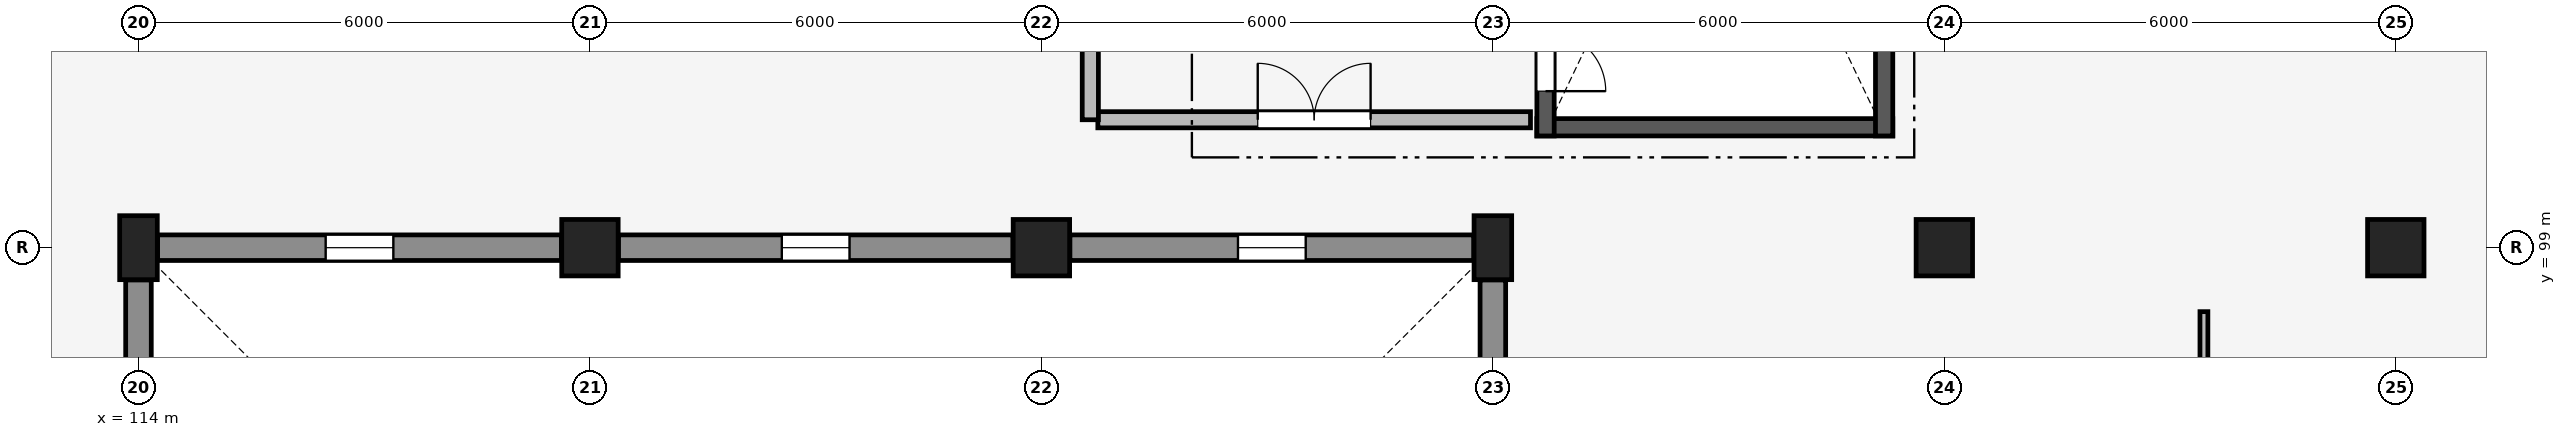
"""IFC4 building model, lengths in metres.
Left out: names, types, materials, properties, quantities, classifications, styles, units other than length and angle.
Written with IfcOpenShell. Run it as: python <this file> out.ifc"""

import sys

from ifc_helpers import new_model, si_unit, direction, frame, frame_2d, origin, origin_2d, place, context, subcontext, project, spatial, rectangle, extrude, element, fill, save


model = new_model("IFC4")
c1 = context("Model", 3, precision=1e-05, world=origin(), true_north=direction((0.0, 1.0)))
c2 = subcontext(c1, "Body", "Model", "MODEL_VIEW")
j1 = project(units=[si_unit("LENGTHUNIT", "METRE"), si_unit("PLANEANGLEUNIT", "RADIAN")], contexts=[c1])
p1 = place(None, origin())
s1 = spatial("IfcSite", under=j1, at=p1, CompositionType="ELEMENT")
p2 = place(p1, origin())
s2 = spatial("IfcBuilding", under=s1, at=p2, CompositionType="ELEMENT")
p3 = place(p2, origin())
s3 = spatial("IfcBuildingStorey", under=s2, at=p3, CompositionType="ELEMENT", Elevation=0.0)
p4 = place(p3, frame((114.0, 99.0, 0.0), z_axis=(0.0, 0.0, 1.0), x_axis=(1.0, 0.0, 0.0)))
e1 = element("IfcColumn", 1, at=p4, inside=s3, PredefinedType="COLUMN", context=c2, shape_type="SweptSolid", body=[
    extrude(rectangle(XDim=0.5, YDim=0.85, at=origin_2d()), origin(), (0.0, 0.0, 1.0), 4.8),
])
for number, where, z_axis, x_axis in (
    (2, (120.0, 99.0, 0.0), (0.0, 0.0, 1.0), (1.0, 0.0, 0.0)),
    (3, (126.0, 99.0, 0.0), (0.0, 0.0, 1.0), (1.0, 0.0, 0.0)),
):
    element("IfcColumn", number, at=place(p3, frame(where, z_axis=z_axis, x_axis=x_axis)), inside=s3, PredefinedType="COLUMN", context=c2, shape_type="SweptSolid", body=[
        extrude(rectangle(XDim=0.75, YDim=0.75, at=origin_2d()), origin(), (0.0, 0.0, 1.0), 4.8),
    ])
p5 = place(p3, frame((132.0, 99.0, 0.0), z_axis=(0.0, 0.0, 1.0), x_axis=(1.0, 0.0, 0.0)))
e4 = element("IfcColumn", 4, at=p5, inside=s3, PredefinedType="COLUMN", context=c2, shape_type="SweptSolid", body=[
    extrude(rectangle(XDim=0.5, YDim=0.85, at=origin_2d()), origin(), (0.0, 0.0, 1.0), 4.8),
])
for number, where, z_axis, x_axis in (
    (5, (138.0, 99.0, 0.0), (0.0, 0.0, 1.0), (1.0, 0.0, 0.0)),
    (6, (144.0, 99.0, 0.0), (0.0, 0.0, 1.0), (1.0, 0.0, 0.0)),
):
    element("IfcColumn", number, at=place(p3, frame(where, z_axis=z_axis, x_axis=x_axis)), inside=s3, PredefinedType="COLUMN", context=c2, shape_type="SweptSolid", body=[
        extrude(rectangle(XDim=0.75, YDim=0.75, at=origin_2d()), origin(), (0.0, 0.0, 1.0), 4.8),
    ])
p6 = place(p3, frame((114.254, 99.0, 0.0), z_axis=(0.0, 0.0, 1.0), x_axis=(1.0, 0.0, 0.0)))
e7 = element("IfcWall", 7, at=p6, inside=s3, PredefinedType="SOLIDWALL", context=c2, shape_type="SweptSolid", body=[
    extrude(rectangle(XDim=5.367, YDim=0.34, at=frame_2d((2.684, 0.0))), origin(), (0.0, 0.0, 1.0), 4.04),
])
p7 = place(p6, frame((2.233, 0.0, 1.6)))
e8 = element("IfcOpeningElement", 8, at=p7, cuts=e7, PredefinedType="OPENING", context=c2, shape_type="SweptSolid", body=[
    extrude(rectangle(XDim=0.9, YDim=0.6, at=frame_2d((0.45, 0.3))), frame((0.0, 0.18, 0.0), z_axis=(0.0, -1.0, 0.0), x_axis=(1.0, 0.0, 0.0)), (0.0, 0.0, 1.0), 0.36),
])
p8 = place(p3, frame((120.379, 99.0, 0.0), z_axis=(0.0, 0.0, 1.0), x_axis=(1.0, 0.0, 0.0)))
e9 = element("IfcWall", 9, at=p8, inside=s3, PredefinedType="SOLIDWALL", context=c2, shape_type="SweptSolid", body=[
    extrude(rectangle(XDim=5.242, YDim=0.34, at=frame_2d((2.621, 0.0))), origin(), (0.0, 0.0, 1.0), 4.14),
])
p9 = place(p8, frame((2.171, 0.0, 1.6)))
e10 = element("IfcOpeningElement", 10, at=p9, cuts=e9, PredefinedType="OPENING", context=c2, shape_type="SweptSolid", body=[
    extrude(rectangle(XDim=0.9, YDim=0.6, at=frame_2d((0.45, 0.3))), frame((0.0, 0.18, 0.0), z_axis=(0.0, -1.0, 0.0), x_axis=(1.0, 0.0, 0.0)), (0.0, 0.0, 1.0), 0.36),
])
p10 = place(p3, frame((126.379, 99.0, 0.0), z_axis=(0.0, 0.0, 1.0), x_axis=(1.0, 0.0, 0.0)))
e11 = element("IfcWall", 11, at=p10, inside=s3, PredefinedType="SOLIDWALL", context=c2, shape_type="SweptSolid", body=[
    extrude(rectangle(XDim=5.367, YDim=0.34, at=frame_2d((2.684, 0.0))), origin(), (0.0, 0.0, 1.0), 4.04),
])
p11 = place(p10, frame((2.233, 0.0, 1.6)))
e12 = element("IfcOpeningElement", 12, at=p11, cuts=e11, PredefinedType="OPENING", context=c2, shape_type="SweptSolid", body=[
    extrude(rectangle(XDim=0.9, YDim=0.6, at=frame_2d((0.45, 0.3))), frame((0.0, 0.18, 0.0), z_axis=(0.0, -1.0, 0.0), x_axis=(1.0, 0.0, 0.0)), (0.0, 0.0, 1.0), 0.36),
])
p12 = place(p3, frame((114.0, 93.379, 0.0), z_axis=(0.0, 0.0, 1.0), x_axis=(0.0, 1.0, 0.0)))
e13 = element("IfcWall", 13, at=p12, inside=s3, PredefinedType="SOLIDWALL", context=c2, shape_type="SweptSolid", body=[
    extrude(rectangle(XDim=5.192, YDim=0.34, at=frame_2d((2.596, 0.0))), origin(), (0.0, 0.0, 1.0), 4.04),
])
p13 = place(p12, frame((2.146, 0.0, 1.6)))
e14 = element("IfcOpeningElement", 14, at=p13, cuts=e13, PredefinedType="OPENING", context=c2, shape_type="SweptSolid", body=[
    extrude(rectangle(XDim=0.9, YDim=0.6, at=frame_2d((0.45, 0.3))), frame((0.0, 0.18, 0.0), z_axis=(0.0, -1.0, 0.0), x_axis=(1.0, 0.0, 0.0)), (0.0, 0.0, 1.0), 0.36),
])
p14 = place(p3, frame((132.0, 93.379, 0.0), z_axis=(0.0, 0.0, 1.0), x_axis=(0.0, 1.0, 0.0)))
e15 = element("IfcWall", 15, at=p14, inside=s3, PredefinedType="SOLIDWALL", context=c2, shape_type="SweptSolid", body=[
    extrude(rectangle(XDim=5.192, YDim=0.34, at=frame_2d((2.596, 0.0))), origin(), (0.0, 0.0, 1.0), 4.04),
])
p15 = place(p14, frame((2.146, 0.0, 1.6)))
e16 = element("IfcOpeningElement", 16, at=p15, cuts=e15, PredefinedType="OPENING", context=c2, shape_type="SweptSolid", body=[
    extrude(rectangle(XDim=0.9, YDim=0.6, at=frame_2d((0.45, 0.3))), frame((0.0, 0.18, 0.0), z_axis=(0.0, -1.0, 0.0), x_axis=(1.0, 0.0, 0.0)), (0.0, 0.0, 1.0), 0.36),
])
p16 = place(p3, frame((132.585, 100.6, 0.0), z_axis=(0.0, 0.0, 1.0), x_axis=(1.0, 0.0, 0.0)))
e17 = element("IfcWall", 17, at=p16, inside=s3, PredefinedType="SHEAR", context=c2, shape_type="SweptSolid", body=[
    extrude(rectangle(XDim=4.73, YDim=0.23, at=frame_2d((2.365, 0.0))), origin(), (0.0, 0.0, 1.0), 4.66),
])
p17 = place(p3, frame((137.2, 100.485, 0.0), z_axis=(0.0, 0.0, 1.0), x_axis=(0.0, 1.0, 0.0)))
e18 = element("IfcWall", 18, at=p17, inside=s3, PredefinedType="SHEAR", context=c2, shape_type="SweptSolid", body=[
    extrude(rectangle(XDim=9.53, YDim=0.23, at=frame_2d((4.765, 0.0))), origin(), (0.0, 0.0, 1.0), 4.66),
])
p18 = place(p3, frame((132.7, 110.015, 0.0), z_axis=(0.0, 0.0, 1.0), x_axis=(0.0, -1.0, 0.0)))
e19 = element("IfcWall", 19, at=p18, inside=s3, PredefinedType="SHEAR", context=c2, shape_type="SweptSolid", body=[
    extrude(rectangle(XDim=9.53, YDim=0.23, at=frame_2d((4.765, 0.0))), origin(), (0.0, 0.0, 1.0), 4.66),
])
p19 = place(p18, frame((7.335, 0.0, 0.0)))
e20 = element("IfcOpeningElement", 20, at=p19, cuts=e19, PredefinedType="OPENING", context=c2, shape_type="SweptSolid", body=[
    extrude(rectangle(XDim=1.6, YDim=2.2, at=frame_2d((0.8, 1.1))), frame((0.0, 0.125, 0.0), z_axis=(0.0, -1.0, 0.0), x_axis=(1.0, 0.0, 0.0)), (0.0, 0.0, 1.0), 0.25),
])
p20 = place(p3, frame((126.75, 100.7, 0.0), z_axis=(0.0, 0.0, 1.0), x_axis=(1.0, 0.0, 0.0)))
e21 = element("IfcWall", 21, at=p20, inside=s3, PredefinedType="PARTITIONING", context=c2, shape_type="SweptSolid", body=[
    extrude(rectangle(XDim=5.75, YDim=0.215, at=frame_2d((2.875, 0.0))), origin(), (0.0, 0.0, 1.0), 4.09),
])
p21 = place(p20, frame((2.125, 0.0, 0.0)))
e22 = element("IfcOpeningElement", 22, at=p21, cuts=e21, PredefinedType="OPENING", context=c2, shape_type="SweptSolid", body=[
    extrude(rectangle(XDim=1.5, YDim=2.15, at=frame_2d((0.75, 1.075))), frame((0.0, 0.117, 0.0), z_axis=(0.0, -1.0, 0.0), x_axis=(1.0, 0.0, 0.0)), (0.0, 0.0, 1.0), 0.235),
])
p22 = place(p3, frame((126.65, 100.7, 0.0), z_axis=(0.0, 0.0, 1.0), x_axis=(0.0, 1.0, 0.0)))
e23 = element("IfcWall", 23, at=p22, inside=s3, PredefinedType="PARTITIONING", context=c2, shape_type="SweptSolid", body=[
    extrude(rectangle(XDim=9.3, YDim=0.215, at=frame_2d((4.65, 0.0))), origin(), (0.0, 0.0, 1.0), 4.04),
])
p23 = place(p3, frame((141.45, 98.15, 0.0), z_axis=(0.0, 0.0, 1.0), x_axis=(0.0, -1.0, 0.0)))
e24 = element("IfcWall", 24, at=p23, inside=s3, PredefinedType="PARTITIONING", context=c2, shape_type="SweptSolid", body=[
    extrude(rectangle(XDim=16.65, YDim=0.105, at=frame_2d((8.325, 0.0))), origin(), (0.0, 0.0, 1.0), 3.89),
])
p24 = place(p23, frame((7.85, 0.0, 0.0)))
e25 = element("IfcOpeningElement", 25, at=p24, cuts=e24, PredefinedType="OPENING", context=c2, shape_type="SweptSolid", body=[
    extrude(rectangle(XDim=0.95, YDim=2.15, at=frame_2d((0.475, 1.075))), frame((0.0, 0.062, 0.0), z_axis=(0.0, -1.0, 0.0), x_axis=(1.0, 0.0, 0.0)), (0.0, 0.0, 1.0), 0.125),
])
p25 = place(p23, frame((9.45, 0.0, 0.9)))
e26 = element("IfcOpeningElement", 26, at=p25, cuts=e24, PredefinedType="OPENING", context=c2, shape_type="SweptSolid", body=[
    extrude(rectangle(XDim=2.2, YDim=1.4, at=frame_2d((1.1, 0.7))), frame((0.0, 0.062, 0.0), z_axis=(0.0, -1.0, 0.0), x_axis=(1.0, 0.0, 0.0)), (0.0, 0.0, 1.0), 0.125),
])
p26 = place(p7, origin())
e27 = element("IfcWindow", 27, at=p26, inside=s3, PartitioningType="SINGLE_PANEL", PredefinedType="WINDOW", context=c2, shape_type="SweptSolid", body=[
    extrude(rectangle(XDim=0.9, YDim=0.6, at=frame_2d((0.45, 0.3))), frame((0.0, 0.03, 0.0), z_axis=(0.0, -1.0, 0.0), x_axis=(1.0, 0.0, 0.0)), (0.0, 0.0, 1.0), 0.06),
])
fill(e8, e27)
p27 = place(p9, origin())
e28 = element("IfcWindow", 28, at=p27, inside=s3, PartitioningType="SINGLE_PANEL", PredefinedType="WINDOW", context=c2, shape_type="SweptSolid", body=[
    extrude(rectangle(XDim=0.9, YDim=0.6, at=frame_2d((0.45, 0.3))), frame((0.0, 0.03, 0.0), z_axis=(0.0, -1.0, 0.0), x_axis=(1.0, 0.0, 0.0)), (0.0, 0.0, 1.0), 0.06),
])
fill(e10, e28)
p28 = place(p11, origin())
e29 = element("IfcWindow", 29, at=p28, inside=s3, PartitioningType="SINGLE_PANEL", PredefinedType="WINDOW", context=c2, shape_type="SweptSolid", body=[
    extrude(rectangle(XDim=0.9, YDim=0.6, at=frame_2d((0.45, 0.3))), frame((0.0, 0.03, 0.0), z_axis=(0.0, -1.0, 0.0), x_axis=(1.0, 0.0, 0.0)), (0.0, 0.0, 1.0), 0.06),
])
fill(e12, e29)
p29 = place(p19, origin())
e30 = element("IfcDoor", 30, at=p29, inside=s3, OperationType="DOUBLE_DOOR_SINGLE_SWING", PredefinedType="DOOR", context=c2, shape_type="SweptSolid", body=[
    extrude(rectangle(XDim=1.6, YDim=2.2, at=frame_2d((0.8, 1.1))), frame((0.0, 0.025, 0.0), z_axis=(0.0, -1.0, 0.0), x_axis=(1.0, 0.0, 0.0)), (0.0, 0.0, 1.0), 0.05),
])
fill(e20, e30)
p30 = place(p21, origin())
e31 = element("IfcDoor", 31, at=p30, inside=s3, OperationType="DOUBLE_DOOR_SINGLE_SWING", PredefinedType="DOOR", context=c2, shape_type="SweptSolid", body=[
    extrude(rectangle(XDim=1.5, YDim=2.15, at=frame_2d((0.75, 1.075))), frame((0.0, 0.025, 0.0), z_axis=(0.0, -1.0, 0.0), x_axis=(1.0, 0.0, 0.0)), (0.0, 0.0, 1.0), 0.05),
])
fill(e22, e31)
save(model, sys.argv[1])
